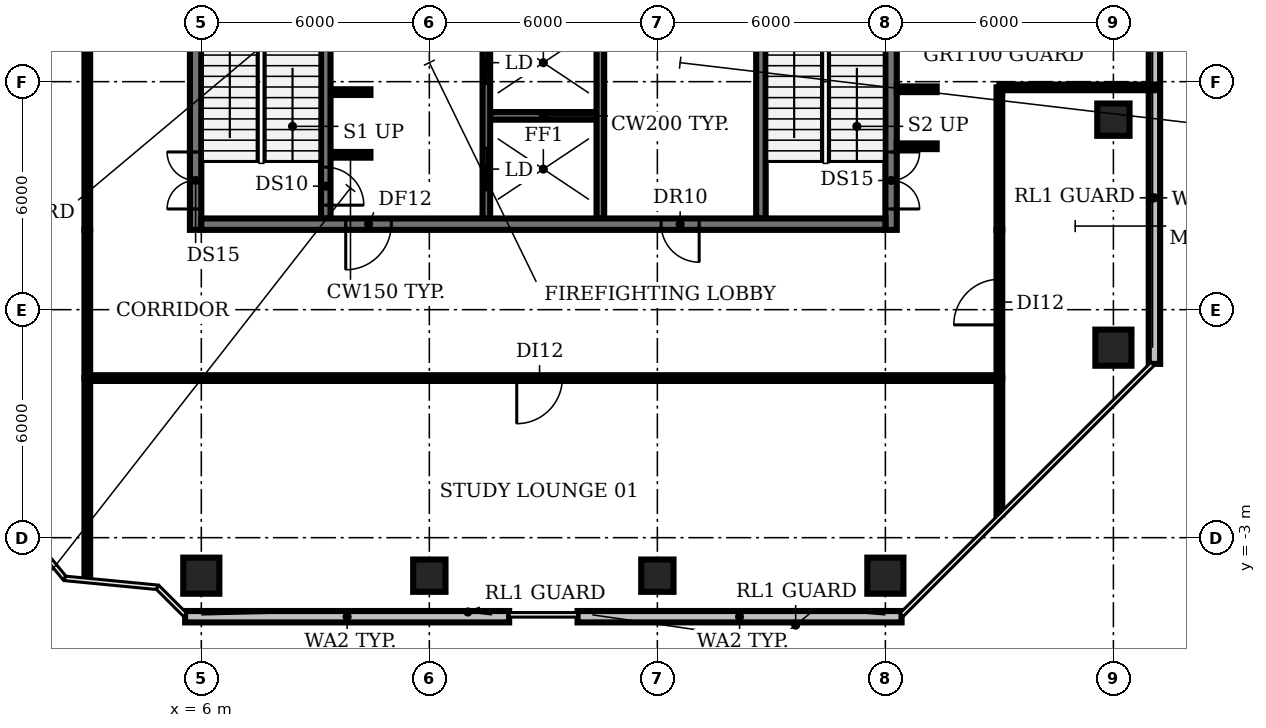
"""IFC4 building model, lengths in metres.
Left out: names, types, materials, properties, quantities, classifications, styles, units other than length and angle.
Written with IfcOpenShell. Run it as: python <this file> out.ifc"""

import sys

from ifc_helpers import new_model, si_unit, direction, frame, frame_2d, origin, origin_2d, place, context, subcontext, project, spatial, rectangle, circle, extrude, element, fill, save


model = new_model("IFC4")
c1 = context("Model", 3, precision=1e-05, world=origin(), true_north=direction((0.0, 1.0)))
c2 = subcontext(c1, "Body", "Model", "MODEL_VIEW")
j1 = project(units=[si_unit("LENGTHUNIT", "METRE"), si_unit("PLANEANGLEUNIT", "RADIAN")], contexts=[c1])
p1 = place(None, origin())
s1 = spatial("IfcSite", under=j1, at=p1, CompositionType="ELEMENT")
p2 = place(p1, origin())
s2 = spatial("IfcBuilding", under=s1, at=p2, CompositionType="ELEMENT")
p3 = place(p2, frame((0.0, 0.0, 264.2)))
s3 = spatial("IfcBuildingStorey", under=s2, at=p3, CompositionType="ELEMENT", Elevation=264.2)
p4 = place(p3, frame((6.0, -4.0, -0.35), z_axis=(0.0, 0.0, 1.0), x_axis=(1.0, 0.0, 0.0)))
e1 = element("IfcColumn", 1, at=p4, inside=s3, PredefinedType="COLUMN", context=c2, shape_type="SweptSolid", body=[
    extrude(circle(Radius=0.475, at=origin_2d()), origin(), (0.0, 0.0, 1.0), 4.2),
])
for number, where, z_axis, x_axis in (
    (2, (12.0, -4.0, -0.35), (0.0, 0.0, 1.0), (1.0, 0.0, 0.0)),
    (3, (18.0, -4.0, -0.35), (0.0, 0.0, 1.0), (1.0, 0.0, 0.0)),
):
    element("IfcColumn", number, at=place(p3, frame(where, z_axis=z_axis, x_axis=x_axis)), inside=s3, PredefinedType="COLUMN", context=c2, shape_type="SweptSolid", body=[
        extrude(rectangle(XDim=0.85, YDim=0.85, at=origin_2d()), origin(), (0.0, 0.0, 1.0), 4.2),
    ])
for number, where, z_axis, x_axis in (
    (4, (24.0, -4.0, -0.35), (0.0, 0.0, 1.0), (1.0, 0.0, 0.0)),
    (5, (30.0, 2.0, -0.35), (0.0, 0.0, 1.0), (1.0, 0.0, 0.0)),
):
    element("IfcColumn", number, at=place(p3, frame(where, z_axis=z_axis, x_axis=x_axis)), inside=s3, PredefinedType="COLUMN", context=c2, shape_type="SweptSolid", body=[
        extrude(circle(Radius=0.475, at=origin_2d()), origin(), (0.0, 0.0, 1.0), 4.2),
    ])
p5 = place(p3, frame((30.0, 8.0, -0.35), z_axis=(0.0, 0.0, 1.0), x_axis=(1.0, 0.0, 0.0)))
e6 = element("IfcColumn", 6, at=p5, inside=s3, PredefinedType="COLUMN", context=c2, shape_type="SweptSolid", body=[
    extrude(rectangle(XDim=0.85, YDim=0.85, at=origin_2d()), origin(), (0.0, 0.0, 1.0), 4.2),
])
for number, where, z_axis, x_axis in (
    (7, (5.573, -5.08, 0.0), (0.0, 0.0, 1.0), (1.0, 0.0, 0.0)),
    (8, (15.9, -5.08, 0.0), (0.0, 0.0, 1.0), (1.0, 0.0, 0.0)),
):
    element("IfcWall", number, at=place(p3, frame(where, z_axis=z_axis, x_axis=x_axis)), inside=s3, PredefinedType="SOLIDWALL", context=c2, shape_type="SweptSolid", body=[
        extrude(rectangle(XDim=8.527, YDim=0.3, at=frame_2d((4.263, 0.0))), origin(), (0.0, 0.0, 1.0), 3.85),
    ])
p6 = place(p3, frame((31.08, 1.573, 0.0), z_axis=(0.0, 0.0, 1.0), x_axis=(0.0, 1.0, 0.0)))
e9 = element("IfcWall", 9, at=p6, inside=s3, PredefinedType="SOLIDWALL", context=c2, shape_type="SweptSolid", body=[
    extrude(rectangle(XDim=8.74, YDim=0.3, at=frame_2d((4.37, 0.0))), origin(), (0.0, 0.0, 1.0), 3.85),
])
p7 = place(p3, frame((9.4, 7.075, 0.0), z_axis=(0.0, 0.0, 1.0), x_axis=(1.0, 0.0, 0.0)))
e10 = element("IfcWall", 10, at=p7, inside=s3, PredefinedType="SHEAR", context=c2, shape_type="SweptSolid", body=[
    extrude(rectangle(XDim=1.05, YDim=0.15, at=frame_2d((0.525, 0.0))), origin(), (0.0, 0.0, 1.0), 3.85),
])
p8 = place(p3, frame((13.6, 8.1, 0.0), z_axis=(0.0, 0.0, 1.0), x_axis=(1.0, 0.0, 0.0)))
e11 = element("IfcWall", 11, at=p8, inside=s3, PredefinedType="SHEAR", context=c2, shape_type="SweptSolid", body=[
    extrude(rectangle(XDim=2.8, YDim=0.2, at=frame_2d((1.4, 0.0))), origin(), (0.0, 0.0, 1.0), 3.85),
])
p9 = place(p3, frame((9.4, 8.725, 0.0), z_axis=(0.0, 0.0, 1.0), x_axis=(1.0, 0.0, 0.0)))
e12 = element("IfcWall", 12, at=p9, inside=s3, PredefinedType="SHEAR", context=c2, shape_type="SweptSolid", body=[
    extrude(rectangle(XDim=1.05, YDim=0.15, at=frame_2d((0.525, 0.0))), origin(), (0.0, 0.0, 1.0), 3.85),
])
p10 = place(p3, frame((9.275, 11.825, 0.0), z_axis=(0.0, 0.0, 1.0), x_axis=(0.0, -1.0, 0.0)))
e13 = element("IfcWall", 13, at=p10, inside=s3, PredefinedType="SHEAR", context=c2, shape_type="SweptSolid", body=[
    extrude(rectangle(XDim=6.425, YDim=0.25, at=frame_2d((3.212, 0.0))), origin(), (0.0, 0.0, 1.0), 3.85),
])
p11 = place(p10, frame((5.075, 0.0, 0.0)))
e14 = element("IfcOpeningElement", 14, at=p11, cuts=e13, PredefinedType="OPENING", context=c2, shape_type="SweptSolid", body=[
    extrude(rectangle(XDim=1.0, YDim=2.1, at=frame_2d((0.5, 1.05))), frame((0.0, 0.135, 0.0), z_axis=(0.0, -1.0, 0.0), x_axis=(1.0, 0.0, 0.0)), (0.0, 0.0, 1.0), 0.27),
])
p12 = place(p3, frame((13.5, 5.4, 0.0), z_axis=(0.0, 0.0, 1.0), x_axis=(0.0, 1.0, 0.0)))
e15 = element("IfcWall", 15, at=p12, inside=s3, PredefinedType="SHEAR", context=c2, shape_type="SweptSolid", body=[
    extrude(rectangle(XDim=8.2, YDim=0.2, at=frame_2d((4.1, 0.0))), origin(), (0.0, 0.0, 1.0), 3.85),
])
p13 = place(p12, frame((0.75, 0.0, 0.0)))
e16 = element("IfcOpeningElement", 16, at=p13, cuts=e15, PredefinedType="OPENING", context=c2, shape_type="SweptSolid", body=[
    extrude(rectangle(XDim=1.1, YDim=2.1, at=frame_2d((0.55, 1.05))), frame((0.0, 0.11, 0.0), z_axis=(0.0, -1.0, 0.0), x_axis=(1.0, 0.0, 0.0)), (0.0, 0.0, 1.0), 0.22),
])
p14 = place(p12, frame((3.55, 0.0, 0.0)))
e17 = element("IfcOpeningElement", 17, at=p14, cuts=e15, PredefinedType="OPENING", context=c2, shape_type="SweptSolid", body=[
    extrude(rectangle(XDim=1.1, YDim=2.1, at=frame_2d((0.55, 1.05))), frame((0.0, 0.11, 0.0), z_axis=(0.0, -1.0, 0.0), x_axis=(1.0, 0.0, 0.0)), (0.0, 0.0, 1.0), 0.22),
])
p15 = place(p12, frame((6.35, 0.0, 0.0)))
e18 = element("IfcOpeningElement", 18, at=p15, cuts=e15, PredefinedType="OPENING", context=c2, shape_type="SweptSolid", body=[
    extrude(rectangle(XDim=1.1, YDim=2.1, at=frame_2d((0.55, 1.05))), frame((0.0, 0.11, 0.0), z_axis=(0.0, -1.0, 0.0), x_axis=(1.0, 0.0, 0.0)), (0.0, 0.0, 1.0), 0.22),
])
p16 = place(p3, frame((16.5, 5.4, 0.0), z_axis=(0.0, 0.0, 1.0), x_axis=(0.0, 1.0, 0.0)))
e19 = element("IfcWall", 19, at=p16, inside=s3, PredefinedType="SHEAR", context=c2, shape_type="SweptSolid", body=[
    extrude(rectangle(XDim=8.2, YDim=0.2, at=frame_2d((4.1, 0.0))), origin(), (0.0, 0.0, 1.0), 3.85),
])
p17 = place(p3, frame((20.725, 5.4, 0.0), z_axis=(0.0, 0.0, 1.0), x_axis=(0.0, 1.0, 0.0)))
e20 = element("IfcWall", 20, at=p17, inside=s3, PredefinedType="SHEAR", context=c2, shape_type="SweptSolid", body=[
    extrude(rectangle(XDim=6.3, YDim=0.25, at=frame_2d((3.15, 0.0))), origin(), (0.0, 0.0, 1.0), 3.85),
])
p18 = place(p3, frame((5.85, 5.1, 0.0), z_axis=(0.0, 0.0, 1.0), x_axis=(0.0, 1.0, 0.0)))
e21 = element("IfcWall", 21, at=p18, inside=s3, PredefinedType="SHEAR", context=c2, shape_type="SweptSolid", body=[
    extrude(rectangle(XDim=20.0, YDim=0.3, at=frame_2d((10.0, 0.0))), origin(), (0.0, 0.0, 1.0), 3.85),
])
p19 = place(p18, frame((0.55, 0.0, 0.0)))
e22 = element("IfcOpeningElement", 22, at=p19, cuts=e21, PredefinedType="OPENING", context=c2, shape_type="SweptSolid", body=[
    extrude(rectangle(XDim=1.5, YDim=2.1, at=frame_2d((0.75, 1.05))), frame((0.0, 0.16, 0.0), z_axis=(0.0, -1.0, 0.0), x_axis=(1.0, 0.0, 0.0)), (0.0, 0.0, 1.0), 0.32),
])
p20 = place(p18, frame((7.0, 0.0, 0.0)))
e23 = element("IfcOpeningElement", 23, at=p20, cuts=e21, PredefinedType="OPENING", context=c2, shape_type="SweptSolid", body=[
    extrude(rectangle(XDim=1.2, YDim=2.1, at=frame_2d((0.6, 1.05))), frame((0.0, 0.16, 0.0), z_axis=(0.0, -1.0, 0.0), x_axis=(1.0, 0.0, 0.0)), (0.0, 0.0, 1.0), 0.32),
])
p21 = place(p18, frame((13.55, 0.0, 0.0)))
e24 = element("IfcOpeningElement", 24, at=p21, cuts=e21, PredefinedType="OPENING", context=c2, shape_type="SweptSolid", body=[
    extrude(rectangle(XDim=1.2, YDim=2.1, at=frame_2d((0.6, 1.05))), frame((0.0, 0.16, 0.0), z_axis=(0.0, -1.0, 0.0), x_axis=(1.0, 0.0, 0.0)), (0.0, 0.0, 1.0), 0.32),
])
p22 = place(p3, frame((24.15, 25.605, 0.0), z_axis=(0.0, 0.0, 1.0), x_axis=(0.0, -1.0, 0.0)))
e25 = element("IfcWall", 25, at=p22, inside=s3, PredefinedType="SHEAR", context=c2, shape_type="SweptSolid", body=[
    extrude(rectangle(XDim=20.505, YDim=0.3, at=frame_2d((10.252, 0.0))), origin(), (0.0, 0.0, 1.0), 3.85),
])
p23 = place(p22, frame((18.455, 0.0, 0.0)))
e26 = element("IfcOpeningElement", 26, at=p23, cuts=e25, PredefinedType="OPENING", context=c2, shape_type="SweptSolid", body=[
    extrude(rectangle(XDim=1.5, YDim=2.1, at=frame_2d((0.75, 1.05))), frame((0.0, 0.16, 0.0), z_axis=(0.0, -1.0, 0.0), x_axis=(1.0, 0.0, 0.0)), (0.0, 0.0, 1.0), 0.32),
])
p24 = place(p22, frame((12.355, 0.0, 0.0)))
e27 = element("IfcOpeningElement", 27, at=p24, cuts=e25, PredefinedType="OPENING", context=c2, shape_type="SweptSolid", body=[
    extrude(rectangle(XDim=0.9, YDim=2.1, at=frame_2d((0.45, 1.05))), frame((0.0, 0.16, 0.0), z_axis=(0.0, -1.0, 0.0), x_axis=(1.0, 0.0, 0.0)), (0.0, 0.0, 1.0), 0.32),
])
p25 = place(p22, frame((6.355, 0.0, 0.0)))
e28 = element("IfcOpeningElement", 28, at=p25, cuts=e25, PredefinedType="OPENING", context=c2, shape_type="SweptSolid", body=[
    extrude(rectangle(XDim=2.0, YDim=2.1, at=frame_2d((1.0, 1.05))), frame((0.0, 0.16, 0.0), z_axis=(0.0, -1.0, 0.0), x_axis=(1.0, 0.0, 0.0)), (0.0, 0.0, 1.0), 0.32),
])
p26 = place(p3, frame((24.0, 5.25, 0.0), z_axis=(0.0, 0.0, 1.0), x_axis=(-1.0, 0.0, 0.0)))
e29 = element("IfcWall", 29, at=p26, inside=s3, PredefinedType="SHEAR", context=c2, shape_type="SweptSolid", body=[
    extrude(rectangle(XDim=18.0, YDim=0.3, at=frame_2d((9.0, 0.0))), origin(), (0.0, 0.0, 1.0), 3.85),
])
p27 = place(p26, frame((13.0, 0.0, 0.0)))
e30 = element("IfcOpeningElement", 30, at=p27, cuts=e29, PredefinedType="OPENING", context=c2, shape_type="SweptSolid", body=[
    extrude(rectangle(XDim=1.2, YDim=2.1, at=frame_2d((0.6, 1.05))), frame((0.0, 0.16, 0.0), z_axis=(0.0, -1.0, 0.0), x_axis=(1.0, 0.0, 0.0)), (0.0, 0.0, 1.0), 0.32),
])
p28 = place(p26, frame((4.9, 0.0, 0.0)))
e31 = element("IfcOpeningElement", 31, at=p28, cuts=e29, PredefinedType="OPENING", context=c2, shape_type="SweptSolid", body=[
    extrude(rectangle(XDim=1.0, YDim=2.1, at=frame_2d((0.5, 1.05))), frame((0.0, 0.16, 0.0), z_axis=(0.0, -1.0, 0.0), x_axis=(1.0, 0.0, 0.0)), (0.0, 0.0, 1.0), 0.32),
])
p29 = place(p3, frame((3.0, -4.08, 0.0), z_axis=(0.0, 0.0, 1.0), x_axis=(0.0, 1.0, 0.0)))
e32 = element("IfcWall", 32, at=p29, inside=s3, PredefinedType="PARTITIONING", context=c2, shape_type="SweptSolid", body=[
    extrude(rectangle(XDim=5.28, YDim=0.15, at=frame_2d((2.64, 0.0))), origin(), (0.0, 0.0, 1.0), 2.9),
])
p30 = place(p3, frame((3.0, 1.2, 0.0), z_axis=(0.0, 0.0, 1.0), x_axis=(0.0, 1.0, 0.0)))
e33 = element("IfcWall", 33, at=p30, inside=s3, PredefinedType="PARTITIONING", context=c2, shape_type="SweptSolid", body=[
    extrude(rectangle(XDim=3.9, YDim=0.15, at=frame_2d((1.95, 0.0))), origin(), (0.0, 0.0, 1.0), 2.9),
])
p31 = place(p3, frame((3.0, 5.1, 0.0), z_axis=(0.0, 0.0, 1.0), x_axis=(0.0, 1.0, 0.0)))
e34 = element("IfcWall", 34, at=p31, inside=s3, PredefinedType="PARTITIONING", context=c2, shape_type="SweptSolid", body=[
    extrude(rectangle(XDim=20.0, YDim=0.15, at=frame_2d((10.0, 0.0))), origin(), (0.0, 0.0, 1.0), 2.9),
])
p32 = place(p31, frame((9.3, 0.0, 0.0)))
e35 = element("IfcOpeningElement", 35, at=p32, cuts=e34, PredefinedType="OPENING", context=c2, shape_type="SweptSolid", body=[
    extrude(rectangle(XDim=1.2, YDim=2.1, at=frame_2d((0.6, 1.05))), frame((0.0, 0.085, 0.0), z_axis=(0.0, -1.0, 0.0), x_axis=(1.0, 0.0, 0.0)), (0.0, 0.0, 1.0), 0.17),
])
for number, where, z_axis, x_axis in (
    (36, (24.3, 7.3, 0.0), (0.0, 0.0, 1.0), (1.0, 0.0, 0.0)),
    (37, (24.3, 8.8, 0.0), (0.0, 0.0, 1.0), (1.0, 0.0, 0.0)),
):
    element("IfcWall", number, at=place(p3, frame(where, z_axis=z_axis, x_axis=x_axis)), inside=s3, PredefinedType="PARTITIONING", context=c2, shape_type="SweptSolid", body=[
        extrude(rectangle(XDim=1.05, YDim=0.15, at=frame_2d((0.525, 0.0))), origin(), (0.0, 0.0, 1.0), 2.9),
    ])
p33 = place(p3, frame((27.0, -2.39, 0.0), z_axis=(0.0, 0.0, 1.0), x_axis=(0.0, 1.0, 0.0)))
e38 = element("IfcWall", 38, at=p33, inside=s3, PredefinedType="PARTITIONING", context=c2, shape_type="SweptSolid", body=[
    extrude(rectangle(XDim=3.59, YDim=0.15, at=frame_2d((1.795, 0.0))), origin(), (0.0, 0.0, 1.0), 2.9),
])
p34 = place(p3, frame((27.0, 1.2, 0.0), z_axis=(0.0, 0.0, 1.0), x_axis=(-1.0, 0.0, 0.0)))
e39 = element("IfcWall", 39, at=p34, inside=s3, PredefinedType="PARTITIONING", context=c2, shape_type="SweptSolid", body=[
    extrude(rectangle(XDim=24.0, YDim=0.15, at=frame_2d((12.0, 0.0))), origin(), (0.0, 0.0, 1.0), 2.9),
])
p35 = place(p34, frame((11.5, 0.0, 0.0)))
e40 = element("IfcOpeningElement", 40, at=p35, cuts=e39, PredefinedType="OPENING", context=c2, shape_type="SweptSolid", body=[
    extrude(rectangle(XDim=1.2, YDim=2.1, at=frame_2d((0.6, 1.05))), frame((0.0, 0.085, 0.0), z_axis=(0.0, -1.0, 0.0), x_axis=(1.0, 0.0, 0.0)), (0.0, 0.0, 1.0), 0.17),
])
p36 = place(p3, frame((27.0, 1.2, 0.0), z_axis=(0.0, 0.0, 1.0), x_axis=(0.0, 1.0, 0.0)))
e41 = element("IfcWall", 41, at=p36, inside=s3, PredefinedType="PARTITIONING", context=c2, shape_type="SweptSolid", body=[
    extrude(rectangle(XDim=3.9, YDim=0.15, at=frame_2d((1.95, 0.0))), origin(), (0.0, 0.0, 1.0), 2.9),
])
p37 = place(p36, frame((1.4, 0.0, 0.0)))
e42 = element("IfcOpeningElement", 42, at=p37, cuts=e41, PredefinedType="OPENING", context=c2, shape_type="SweptSolid", body=[
    extrude(rectangle(XDim=1.2, YDim=2.1, at=frame_2d((0.6, 1.05))), frame((0.0, 0.085, 0.0), z_axis=(0.0, -1.0, 0.0), x_axis=(1.0, 0.0, 0.0)), (0.0, 0.0, 1.0), 0.17),
])
p38 = place(p3, frame((27.0, 5.1, 0.0), z_axis=(0.0, 0.0, 1.0), x_axis=(0.0, 1.0, 0.0)))
e43 = element("IfcWall", 43, at=p38, inside=s3, PredefinedType="PARTITIONING", context=c2, shape_type="SweptSolid", body=[
    extrude(rectangle(XDim=3.75, YDim=0.15, at=frame_2d((1.875, 0.0))), origin(), (0.0, 0.0, 1.0), 2.9),
])
p39 = place(p3, frame((27.0, 8.85, 0.0), z_axis=(0.0, 0.0, 1.0), x_axis=(1.0, 0.0, 0.0)))
e44 = element("IfcWall", 44, at=p39, inside=s3, PredefinedType="PARTITIONING", context=c2, shape_type="SweptSolid", body=[
    extrude(rectangle(XDim=4.09, YDim=0.15, at=frame_2d((2.045, 0.0))), origin(), (0.0, 0.0, 1.0), 2.9),
])
p40 = place(p11, origin())
e45 = element("IfcDoor", 45, at=p40, inside=s3, OperationType="SINGLE_SWING_RIGHT", PredefinedType="DOOR", context=c2, shape_type="SweptSolid", body=[
    extrude(rectangle(XDim=1.0, YDim=2.1, at=frame_2d((0.5, 1.05))), frame((0.0, 0.025, 0.0), z_axis=(0.0, -1.0, 0.0), x_axis=(1.0, 0.0, 0.0)), (0.0, 0.0, 1.0), 0.05),
])
fill(e14, e45)
p41 = place(p13, origin())
e46 = element("IfcDoor", 46, at=p41, inside=s3, OperationType="DOUBLE_DOOR_SLIDING", PredefinedType="DOOR", context=c2, shape_type="SweptSolid", body=[
    extrude(rectangle(XDim=1.1, YDim=2.1, at=frame_2d((0.55, 1.05))), frame((0.0, 0.025, 0.0), z_axis=(0.0, -1.0, 0.0), x_axis=(1.0, 0.0, 0.0)), (0.0, 0.0, 1.0), 0.05),
])
fill(e16, e46)
p42 = place(p14, origin())
e47 = element("IfcDoor", 47, at=p42, inside=s3, OperationType="DOUBLE_DOOR_SLIDING", PredefinedType="DOOR", context=c2, shape_type="SweptSolid", body=[
    extrude(rectangle(XDim=1.1, YDim=2.1, at=frame_2d((0.55, 1.05))), frame((0.0, 0.025, 0.0), z_axis=(0.0, -1.0, 0.0), x_axis=(1.0, 0.0, 0.0)), (0.0, 0.0, 1.0), 0.05),
])
fill(e17, e47)
p43 = place(p19, origin())
e48 = element("IfcDoor", 48, at=p43, inside=s3, OperationType="DOUBLE_DOOR_SINGLE_SWING", PredefinedType="DOOR", context=c2, shape_type="SweptSolid", body=[
    extrude(rectangle(XDim=1.5, YDim=2.1, at=frame_2d((0.75, 1.05))), frame((0.0, 0.025, 0.0), z_axis=(0.0, -1.0, 0.0), x_axis=(1.0, 0.0, 0.0)), (0.0, 0.0, 1.0), 0.05),
])
fill(e22, e48)
p44 = place(p23, origin())
e49 = element("IfcDoor", 49, at=p44, inside=s3, OperationType="DOUBLE_DOOR_SINGLE_SWING", PredefinedType="DOOR", context=c2, shape_type="SweptSolid", body=[
    extrude(rectangle(XDim=1.5, YDim=2.1, at=frame_2d((0.75, 1.05))), frame((0.0, 0.025, 0.0), z_axis=(0.0, -1.0, 0.0), x_axis=(1.0, 0.0, 0.0)), (0.0, 0.0, 1.0), 0.05),
])
fill(e26, e49)
p45 = place(p27, origin())
e50 = element("IfcDoor", 50, at=p45, inside=s3, OperationType="SINGLE_SWING_RIGHT", PredefinedType="DOOR", context=c2, shape_type="SweptSolid", body=[
    extrude(rectangle(XDim=1.2, YDim=2.1, at=frame_2d((0.6, 1.05))), frame((0.0, 0.025, 0.0), z_axis=(0.0, -1.0, 0.0), x_axis=(1.0, 0.0, 0.0)), (0.0, 0.0, 1.0), 0.05),
])
fill(e30, e50)
p46 = place(p28, origin())
e51 = element("IfcDoor", 51, at=p46, inside=s3, OperationType="SINGLE_SWING_LEFT", PredefinedType="DOOR", context=c2, shape_type="SweptSolid", body=[
    extrude(rectangle(XDim=1.0, YDim=2.1, at=frame_2d((0.5, 1.05))), frame((0.0, 0.025, 0.0), z_axis=(0.0, -1.0, 0.0), x_axis=(1.0, 0.0, 0.0)), (0.0, 0.0, 1.0), 0.05),
])
fill(e31, e51)
p47 = place(p35, origin())
e52 = element("IfcDoor", 52, at=p47, inside=s3, OperationType="SINGLE_SWING_RIGHT", PredefinedType="DOOR", context=c2, shape_type="SweptSolid", body=[
    extrude(rectangle(XDim=1.2, YDim=2.1, at=frame_2d((0.6, 1.05))), frame((0.0, 0.025, 0.0), z_axis=(0.0, -1.0, 0.0), x_axis=(1.0, 0.0, 0.0)), (0.0, 0.0, 1.0), 0.05),
])
fill(e40, e52)
p48 = place(p37, origin())
e53 = element("IfcDoor", 53, at=p48, inside=s3, OperationType="SINGLE_SWING_LEFT", PredefinedType="DOOR", context=c2, shape_type="SweptSolid", body=[
    extrude(rectangle(XDim=1.2, YDim=2.1, at=frame_2d((0.6, 1.05))), frame((0.0, 0.025, 0.0), z_axis=(0.0, -1.0, 0.0), x_axis=(1.0, 0.0, 0.0)), (0.0, 0.0, 1.0), 0.05),
])
fill(e42, e53)
save(model, sys.argv[1])
